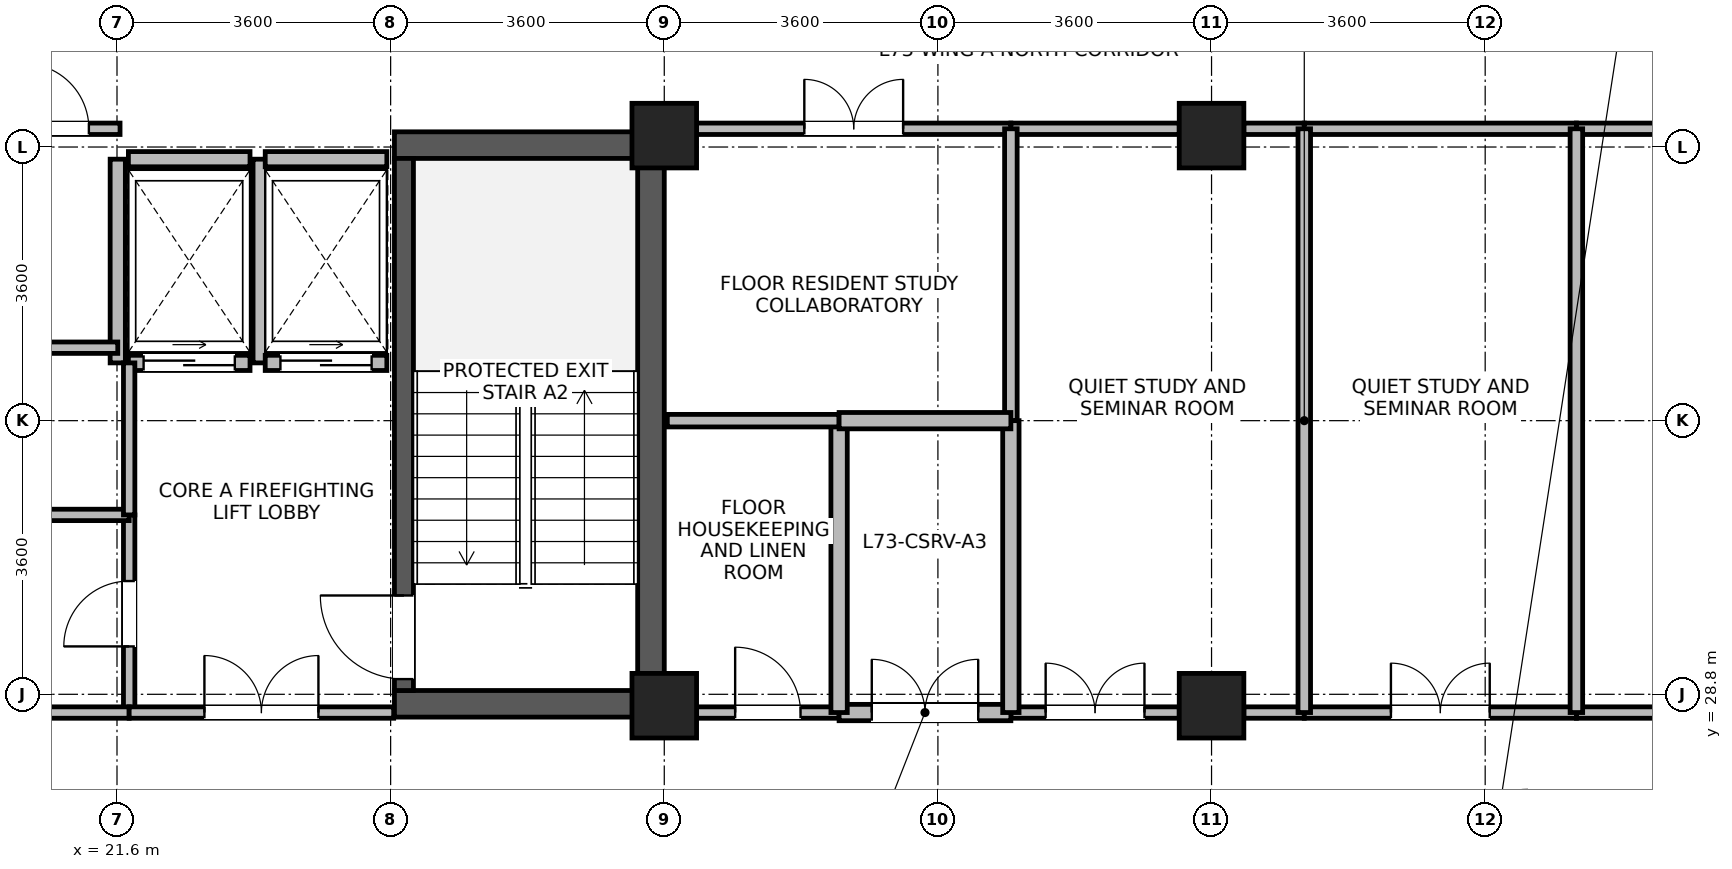
"""IFC4 building model, lengths in metres.
Left out: names, types, materials, properties, quantities, classifications, styles, units other than length and angle.
Written with IfcOpenShell. Run it as: python <this file> out.ifc"""

import sys

from ifc_helpers import new_model, si_unit, direction, frame, frame_2d, origin, origin_2d, place, context, subcontext, project, spatial, rectangle, extrude, source, transform, mapped, element, fill, save


model = new_model("IFC4")
c1 = context("Model", 3, precision=1e-05, world=origin(), true_north=direction((0.0, 1.0)))
c2 = subcontext(c1, "Body", "Model", "MODEL_VIEW")
j1 = project(units=[si_unit("LENGTHUNIT", "METRE"), si_unit("PLANEANGLEUNIT", "RADIAN")], contexts=[c1])
p1 = place(None, origin())
s1 = spatial("IfcSite", under=j1, at=p1, CompositionType="ELEMENT")
p2 = place(p1, origin())
s2 = spatial("IfcBuilding", under=s1, at=p2, CompositionType="ELEMENT")
p3 = place(p2, frame((0.0, 0.0, 283.2)))
s3 = spatial("IfcBuildingStorey", under=s2, at=p3, CompositionType="ELEMENT", Elevation=283.2)
p4 = place(p3, frame((28.625, 28.5, 0.0), z_axis=(0.0, 0.0, 1.0), x_axis=(0.0, 1.0, 0.0)))
e1 = element("IfcWall", 1, at=p4, inside=s3, PredefinedType="SHEAR", context=c2, shape_type="SweptSolid", body=[
    extrude(rectangle(XDim=7.7, YDim=0.35, at=frame_2d((3.85, 0.0))), origin(), (0.0, 0.0, 1.0), 3.475),
])
for number, where, z_axis, x_axis in (
    (2, (25.25, 28.675, 0.0), (0.0, 0.0, 1.0), (1.0, 0.0, 0.0)),
    (3, (25.25, 36.025, 0.0), (0.0, 0.0, 1.0), (1.0, 0.0, 0.0)),
):
    element("IfcWall", number, at=place(p3, frame(where, z_axis=z_axis, x_axis=x_axis)), inside=s3, PredefinedType="SHEAR", context=c2, shape_type="SweptSolid", body=[
        extrude(rectangle(XDim=3.2, YDim=0.35, at=frame_2d((1.6, 0.0))), origin(), (0.0, 0.0, 1.0), 3.475),
    ])
p5 = place(p3, frame((25.375, 28.85, 0.0), z_axis=(0.0, 0.0, 1.0), x_axis=(0.0, 1.0, 0.0)))
e4 = element("IfcWall", 4, at=p5, inside=s3, PredefinedType="SHEAR", context=c2, shape_type="SweptSolid", body=[
    extrude(rectangle(XDim=7.0, YDim=0.25, at=frame_2d((3.5, 0.0))), origin(), (0.0, 0.0, 1.0), 3.475),
])
p6 = place(p5, frame((0.15, 0.0, 0.0)))
e5 = element("IfcOpeningElement", 5, at=p6, cuts=e4, PredefinedType="OPENING", context=c2, shape_type="SweptSolid", body=[
    extrude(rectangle(XDim=1.1, YDim=2.08, at=frame_2d((0.55, 1.04))), frame((0.0, 0.135, 0.0), z_axis=(0.0, -1.0, 0.0), x_axis=(1.0, 0.0, 0.0)), (0.0, 0.0, 1.0), 0.27),
])
m1 = source(origin(), c2, "Body", "SweptSolid", [
    extrude(rectangle(XDim=0.85, YDim=0.85, at=origin_2d()), origin(), (0.0, 0.0, 1.0), 3.7),
])
for number, where, z_axis, x_axis in (
    (6, (28.8, 28.65, 0.0), (0.0, 0.0, 1.0), (1.0, 0.0, 0.0)),
    (7, (28.8, 36.15, 0.0), (0.0, 0.0, 1.0), (1.0, 0.0, 0.0)),
    (8, (36.0, 28.65, 0.0), (0.0, 0.0, 1.0), (1.0, 0.0, 0.0)),
    (9, (36.0, 36.15, 0.0), (0.0, 0.0, 1.0), (1.0, 0.0, 0.0)),
):
    element("IfcColumn", number, at=place(p3, frame(where, z_axis=z_axis, x_axis=x_axis)), inside=s3, PredefinedType="COLUMN", context=c2, shape_type="MappedRepresentation", body=[
        mapped(m1, transform((0.0, 0.0, 0.0), x_axis=(1.0, 0.0, 0.0), y_axis=(0.0, 1.0, 0.0), z_axis=(0.0, 0.0, 1.0), scale=1.0)),
    ])
p7 = place(p3, frame((21.75, 33.16, 0.0), z_axis=(0.0, 0.0, 1.0), x_axis=(1.0, 0.0, 0.0)))
e10 = element("IfcWall", 10, at=p7, inside=s3, PredefinedType="PARTITIONING", context=c2, shape_type="SweptSolid", body=[
    extrude(rectangle(XDim=1.6, YDim=0.2, at=frame_2d((0.8, 0.0))), origin(), (0.0, 0.0, 1.0), 3.455),
])
p8 = place(p7, frame((0.2, 0.0, 0.0)))
e11 = element("IfcOpeningElement", 11, at=p8, cuts=e10, PredefinedType="OPENING", context=c2, shape_type="SweptSolid", body=[
    extrude(rectangle(XDim=1.2, YDim=2.12, at=frame_2d((0.6, 1.06))), frame((0.0, 0.11, 0.0), z_axis=(0.0, -1.0, 0.0), x_axis=(1.0, 0.0, 0.0)), (0.0, 0.0, 1.0), 0.22),
])
p9 = place(p3, frame((21.75, 35.84, 0.0), z_axis=(0.0, 0.0, 1.0), x_axis=(1.0, 0.0, 0.0)))
e12 = element("IfcWall", 12, at=p9, inside=s3, PredefinedType="PARTITIONING", context=c2, shape_type="SweptSolid", body=[
    extrude(rectangle(XDim=1.6, YDim=0.2, at=frame_2d((0.8, 0.0))), origin(), (0.0, 0.0, 1.0), 2.555),
])
for number, where, z_axis, x_axis in (
    (13, (21.61, 33.16, 0.0), (0.0, 0.0, 1.0), (0.0, 1.0, 0.0)),
    (14, (23.49, 33.16, 0.0), (0.0, 0.0, 1.0), (0.0, 1.0, 0.0)),
):
    element("IfcWall", number, at=place(p3, frame(where, z_axis=z_axis, x_axis=x_axis)), inside=s3, PredefinedType="PARTITIONING", context=c2, shape_type="SweptSolid", body=[
        extrude(rectangle(XDim=2.68, YDim=0.2, at=frame_2d((1.34, 0.0))), origin(), (0.0, 0.0, 1.0), 3.455),
    ])
p10 = place(p3, frame((23.55, 33.16, 0.0), z_axis=(0.0, 0.0, 1.0), x_axis=(1.0, 0.0, 0.0)))
e15 = element("IfcWall", 15, at=p10, inside=s3, PredefinedType="PARTITIONING", context=c2, shape_type="SweptSolid", body=[
    extrude(rectangle(XDim=1.6, YDim=0.2, at=frame_2d((0.8, 0.0))), origin(), (0.0, 0.0, 1.0), 3.455),
])
p11 = place(p10, frame((0.2, 0.0, 0.0)))
e16 = element("IfcOpeningElement", 16, at=p11, cuts=e15, PredefinedType="OPENING", context=c2, shape_type="SweptSolid", body=[
    extrude(rectangle(XDim=1.2, YDim=2.12, at=frame_2d((0.6, 1.06))), frame((0.0, 0.11, 0.0), z_axis=(0.0, -1.0, 0.0), x_axis=(1.0, 0.0, 0.0)), (0.0, 0.0, 1.0), 0.22),
])
p12 = place(p3, frame((23.55, 35.84, 0.0), z_axis=(0.0, 0.0, 1.0), x_axis=(1.0, 0.0, 0.0)))
e17 = element("IfcWall", 17, at=p12, inside=s3, PredefinedType="PARTITIONING", context=c2, shape_type="SweptSolid", body=[
    extrude(rectangle(XDim=1.6, YDim=0.2, at=frame_2d((0.8, 0.0))), origin(), (0.0, 0.0, 1.0), 2.555),
])
p13 = place(p3, frame((40.8, 28.56, 0.0), z_axis=(0.0, 0.0, 1.0), x_axis=(1.0, 0.0, 0.0)))
e18 = element("IfcWall", 18, at=p13, inside=s3, PredefinedType="PARTITIONING", context=c2, shape_type="SweptSolid", body=[
    extrude(rectangle(XDim=5.575, YDim=0.15, at=frame_2d((2.788, 0.0))), origin(), (0.0, 0.0, 1.0), 2.905),
])
p14 = place(p13, frame((2.137, 0.0, 0.0)))
e19 = element("IfcOpeningElement", 19, at=p14, cuts=e18, PredefinedType="OPENING", context=c2, shape_type="SweptSolid", body=[
    extrude(rectangle(XDim=1.3, YDim=2.12, at=frame_2d((0.65, 1.06))), frame((0.0, 0.085, 0.0), z_axis=(0.0, -1.0, 0.0), x_axis=(1.0, 0.0, 0.0)), (0.0, 0.0, 1.0), 0.17),
])
p15 = place(p3, frame((40.8, 36.24, 0.0), z_axis=(0.0, 0.0, 1.0), x_axis=(1.0, 0.0, 0.0)))
e20 = element("IfcWall", 20, at=p15, inside=s3, PredefinedType="PARTITIONING", context=c2, shape_type="SweptSolid", body=[
    extrude(rectangle(XDim=5.575, YDim=0.15, at=frame_2d((2.788, 0.0))), origin(), (0.0, 0.0, 1.0), 2.905),
])
p16 = place(p3, frame((29.225, 36.24, 0.0), z_axis=(0.0, 0.0, 1.0), x_axis=(1.0, 0.0, 0.0)))
e21 = element("IfcWall", 21, at=p16, inside=s3, PredefinedType="PARTITIONING", context=c2, shape_type="SweptSolid", body=[
    extrude(rectangle(XDim=4.135, YDim=0.15, at=frame_2d((2.067, 0.0))), origin(), (0.0, 0.0, 1.0), 2.905),
])
p17 = place(p16, frame((1.417, 0.0, 0.0)))
e22 = element("IfcOpeningElement", 22, at=p17, cuts=e21, PredefinedType="OPENING", context=c2, shape_type="SweptSolid", body=[
    extrude(rectangle(XDim=1.3, YDim=2.12, at=frame_2d((0.65, 1.06))), frame((0.0, 0.085, 0.0), z_axis=(0.0, -1.0, 0.0), x_axis=(1.0, 0.0, 0.0)), (0.0, 0.0, 1.0), 0.17),
])
p18 = place(p3, frame((33.36, 28.56, 0.0), z_axis=(0.0, 0.0, 1.0), x_axis=(1.0, 0.0, 0.0)))
e23 = element("IfcWall", 23, at=p18, inside=s3, PredefinedType="PARTITIONING", context=c2, shape_type="SweptSolid", body=[
    extrude(rectangle(XDim=2.215, YDim=0.15, at=frame_2d((1.107, 0.0))), origin(), (0.0, 0.0, 1.0), 2.905),
])
p19 = place(p18, frame((0.458, 0.0, 0.0)))
e24 = element("IfcOpeningElement", 24, at=p19, cuts=e23, PredefinedType="OPENING", context=c2, shape_type="SweptSolid", body=[
    extrude(rectangle(XDim=1.3, YDim=2.12, at=frame_2d((0.65, 1.06))), frame((0.0, 0.085, 0.0), z_axis=(0.0, -1.0, 0.0), x_axis=(1.0, 0.0, 0.0)), (0.0, 0.0, 1.0), 0.17),
])
p20 = place(p3, frame((36.425, 28.56, 0.0), z_axis=(0.0, 0.0, 1.0), x_axis=(1.0, 0.0, 0.0)))
e25 = element("IfcWall", 25, at=p20, inside=s3, PredefinedType="PARTITIONING", context=c2, shape_type="SweptSolid", body=[
    extrude(rectangle(XDim=0.795, YDim=0.15, at=frame_2d((0.397, 0.0))), origin(), (0.0, 0.0, 1.0), 2.905),
])
p21 = place(p3, frame((33.36, 36.24, 0.0), z_axis=(0.0, 0.0, 1.0), x_axis=(1.0, 0.0, 0.0)))
e26 = element("IfcWall", 26, at=p21, inside=s3, PredefinedType="PARTITIONING", context=c2, shape_type="SweptSolid", body=[
    extrude(rectangle(XDim=2.215, YDim=0.15, at=frame_2d((1.107, 0.0))), origin(), (0.0, 0.0, 1.0), 2.905),
])
p22 = place(p3, frame((36.425, 36.24, 0.0), z_axis=(0.0, 0.0, 1.0), x_axis=(1.0, 0.0, 0.0)))
e27 = element("IfcWall", 27, at=p22, inside=s3, PredefinedType="PARTITIONING", context=c2, shape_type="SweptSolid", body=[
    extrude(rectangle(XDim=0.795, YDim=0.15, at=frame_2d((0.397, 0.0))), origin(), (0.0, 0.0, 1.0), 2.905),
])
p23 = place(p3, frame((37.22, 28.56, 0.0), z_axis=(0.0, 0.0, 1.0), x_axis=(1.0, 0.0, 0.0)))
e28 = element("IfcWall", 28, at=p23, inside=s3, PredefinedType="PARTITIONING", context=c2, shape_type="SweptSolid", body=[
    extrude(rectangle(XDim=3.58, YDim=0.15, at=frame_2d((1.79, 0.0))), origin(), (0.0, 0.0, 1.0), 2.905),
])
p24 = place(p23, frame((1.14, 0.0, 0.0)))
e29 = element("IfcOpeningElement", 29, at=p24, cuts=e28, PredefinedType="OPENING", context=c2, shape_type="SweptSolid", body=[
    extrude(rectangle(XDim=1.3, YDim=2.12, at=frame_2d((0.65, 1.06))), frame((0.0, 0.085, 0.0), z_axis=(0.0, -1.0, 0.0), x_axis=(1.0, 0.0, 0.0)), (0.0, 0.0, 1.0), 0.17),
])
p25 = place(p3, frame((37.22, 36.24, 0.0), z_axis=(0.0, 0.0, 1.0), x_axis=(1.0, 0.0, 0.0)))
e30 = element("IfcWall", 30, at=p25, inside=s3, PredefinedType="PARTITIONING", context=c2, shape_type="SweptSolid", body=[
    extrude(rectangle(XDim=3.58, YDim=0.15, at=frame_2d((1.79, 0.0))), origin(), (0.0, 0.0, 1.0), 2.905),
])
p26 = place(p3, frame((21.76, 28.56, 0.0), z_axis=(0.0, 0.0, 1.0), x_axis=(0.0, 1.0, 0.0)))
e31 = element("IfcWall", 31, at=p26, inside=s3, PredefinedType="PARTITIONING", context=c2, shape_type="SweptSolid", body=[
    extrude(rectangle(XDim=2.6, YDim=0.15, at=frame_2d((1.3, 0.0))), origin(), (0.0, 0.0, 1.0), 3.455),
])
p27 = place(p26, frame((0.87, 0.0, 0.0)))
e32 = element("IfcOpeningElement", 32, at=p27, cuts=e31, PredefinedType="OPENING", context=c2, shape_type="SweptSolid", body=[
    extrude(rectangle(XDim=0.86, YDim=2.02, at=frame_2d((0.43, 1.01))), frame((0.0, 0.085, 0.0), z_axis=(0.0, -1.0, 0.0), x_axis=(1.0, 0.0, 0.0)), (0.0, 0.0, 1.0), 0.17),
])
p28 = place(p3, frame((29.225, 28.56, 0.0), z_axis=(0.0, 0.0, 1.0), x_axis=(1.0, 0.0, 0.0)))
e33 = element("IfcWall", 33, at=p28, inside=s3, PredefinedType="PARTITIONING", context=c2, shape_type="SweptSolid", body=[
    extrude(rectangle(XDim=1.875, YDim=0.15, at=frame_2d((0.938, 0.0))), origin(), (0.0, 0.0, 1.0), 2.905),
])
p29 = place(p28, frame((0.508, 0.0, 0.0)))
e34 = element("IfcOpeningElement", 34, at=p29, cuts=e33, PredefinedType="OPENING", context=c2, shape_type="SweptSolid", body=[
    extrude(rectangle(XDim=0.86, YDim=2.02, at=frame_2d((0.43, 1.01))), frame((0.0, 0.085, 0.0), z_axis=(0.0, -1.0, 0.0), x_axis=(1.0, 0.0, 0.0)), (0.0, 0.0, 1.0), 0.17),
])
p30 = place(p3, frame((31.1, 28.56, 0.0), z_axis=(0.0, 0.0, 1.0), x_axis=(1.0, 0.0, 0.0)))
e35 = element("IfcWall", 35, at=p30, inside=s3, PredefinedType="PARTITIONING", context=c2, shape_type="SweptSolid", body=[
    extrude(rectangle(XDim=2.26, YDim=0.215, at=frame_2d((1.13, 0.0))), origin(), (0.0, 0.0, 1.0), 2.905),
])
p31 = place(p30, frame((0.43, 0.0, 0.0)))
e36 = element("IfcOpeningElement", 36, at=p31, cuts=e35, PredefinedType="OPENING", context=c2, shape_type="SweptSolid", body=[
    extrude(rectangle(XDim=1.4, YDim=2.15, at=frame_2d((0.7, 1.075))), frame((0.0, 0.118, 0.0), z_axis=(0.0, -1.0, 0.0), x_axis=(1.0, 0.0, 0.0)), (0.0, 0.0, 1.0), 0.235),
])
p32 = place(p3, frame((19.96, 33.36, 0.0), z_axis=(0.0, 0.0, 1.0), x_axis=(1.0, 0.0, 0.0)))
e37 = element("IfcWall", 37, at=p32, inside=s3, PredefinedType="PARTITIONING", context=c2, shape_type="SweptSolid", body=[
    extrude(rectangle(XDim=1.65, YDim=0.15, at=frame_2d((0.825, 0.0))), origin(), (0.0, 0.0, 1.0), 3.455),
])
p33 = place(p3, frame((19.96, 36.24, 0.0), z_axis=(0.0, 0.0, 1.0), x_axis=(1.0, 0.0, 0.0)))
e38 = element("IfcWall", 38, at=p33, inside=s3, PredefinedType="PARTITIONING", context=c2, shape_type="SweptSolid", body=[
    extrude(rectangle(XDim=1.68, YDim=0.15, at=frame_2d((0.84, 0.0))), origin(), (0.0, 0.0, 1.0), 2.555),
])
p34 = place(p33, frame((0.41, 0.0, 0.0)))
e39 = element("IfcOpeningElement", 39, at=p34, cuts=e38, PredefinedType="OPENING", context=c2, shape_type="SweptSolid", body=[
    extrude(rectangle(XDim=0.86, YDim=2.02, at=frame_2d((0.43, 1.01))), frame((0.0, 0.085, 0.0), z_axis=(0.0, -1.0, 0.0), x_axis=(1.0, 0.0, 0.0)), (0.0, 0.0, 1.0), 0.17),
])
p35 = place(p3, frame((20.56, 28.56, 0.0), z_axis=(0.0, 0.0, 1.0), x_axis=(1.0, 0.0, 0.0)))
e40 = element("IfcWall", 40, at=p35, inside=s3, PredefinedType="PARTITIONING", context=c2, shape_type="SweptSolid", body=[
    extrude(rectangle(XDim=1.2, YDim=0.15, at=frame_2d((0.6, 0.0))), origin(), (0.0, 0.0, 1.0), 2.555),
])
p36 = place(p3, frame((20.56, 31.16, 0.0), z_axis=(0.0, 0.0, 1.0), x_axis=(1.0, 0.0, 0.0)))
e41 = element("IfcWall", 41, at=p36, inside=s3, PredefinedType="PARTITIONING", context=c2, shape_type="SweptSolid", body=[
    extrude(rectangle(XDim=1.2, YDim=0.15, at=frame_2d((0.6, 0.0))), origin(), (0.0, 0.0, 1.0), 3.455),
])
for number, where, z_axis, x_axis in (
    (42, (37.22, 28.56, 0.0), (0.0, 0.0, 1.0), (0.0, 1.0, 0.0)),
    (43, (40.8, 28.56, 0.0), (0.0, 0.0, 1.0), (0.0, 1.0, 0.0)),
):
    element("IfcWall", number, at=place(p3, frame(where, z_axis=z_axis, x_axis=x_axis)), inside=s3, PredefinedType="PARTITIONING", context=c2, shape_type="SweptSolid", body=[
        extrude(rectangle(XDim=7.68, YDim=0.165, at=frame_2d((3.84, 0.0))), origin(), (0.0, 0.0, 1.0), 3.455),
    ])
p37 = place(p3, frame((33.36, 32.4, 0.0), z_axis=(0.0, 0.0, 1.0), x_axis=(0.0, 1.0, 0.0)))
e44 = element("IfcWall", 44, at=p37, inside=s3, PredefinedType="PARTITIONING", context=c2, shape_type="SweptSolid", body=[
    extrude(rectangle(XDim=3.84, YDim=0.165, at=frame_2d((1.92, 0.0))), origin(), (0.0, 0.0, 1.0), 3.455),
])
for number, where, z_axis, x_axis in (
    (45, (31.1, 28.56, 0.0), (0.0, 0.0, 1.0), (0.0, 1.0, 0.0)),
    (46, (33.36, 28.56, 0.0), (0.0, 0.0, 1.0), (0.0, 1.0, 0.0)),
):
    element("IfcWall", number, at=place(p3, frame(where, z_axis=z_axis, x_axis=x_axis)), inside=s3, PredefinedType="PARTITIONING", context=c2, shape_type="SweptSolid", body=[
        extrude(rectangle(XDim=3.84, YDim=0.215, at=frame_2d((1.92, 0.0))), origin(), (0.0, 0.0, 1.0), 3.455),
    ])
p38 = place(p3, frame((21.76, 28.56, 0.0), z_axis=(0.0, 0.0, 1.0), x_axis=(1.0, 0.0, 0.0)))
e47 = element("IfcWall", 47, at=p38, inside=s3, PredefinedType="PARTITIONING", context=c2, shape_type="SweptSolid", body=[
    extrude(rectangle(XDim=3.48, YDim=0.15, at=frame_2d((1.74, 0.0))), origin(), (0.0, 0.0, 1.0), 2.555),
])
p39 = place(p38, frame((0.99, 0.0, 0.0)))
e48 = element("IfcOpeningElement", 48, at=p39, cuts=e47, PredefinedType="OPENING", context=c2, shape_type="SweptSolid", body=[
    extrude(rectangle(XDim=1.5, YDim=2.1, at=frame_2d((0.75, 1.05))), frame((0.0, 0.085, 0.0), z_axis=(0.0, -1.0, 0.0), x_axis=(1.0, 0.0, 0.0)), (0.0, 0.0, 1.0), 0.17),
])
p40 = place(p3, frame((28.84, 32.4, 0.0), z_axis=(0.0, 0.0, 1.0), x_axis=(1.0, 0.0, 0.0)))
e49 = element("IfcWall", 49, at=p40, inside=s3, PredefinedType="PARTITIONING", context=c2, shape_type="SweptSolid", body=[
    extrude(rectangle(XDim=2.26, YDim=0.165, at=frame_2d((1.13, 0.0))), origin(), (0.0, 0.0, 1.0), 3.455),
])
p41 = place(p3, frame((31.1, 32.4, 0.0), z_axis=(0.0, 0.0, 1.0), x_axis=(1.0, 0.0, 0.0)))
e50 = element("IfcWall", 50, at=p41, inside=s3, PredefinedType="PARTITIONING", context=c2, shape_type="SweptSolid", body=[
    extrude(rectangle(XDim=2.26, YDim=0.215, at=frame_2d((1.13, 0.0))), origin(), (0.0, 0.0, 1.0), 3.455),
])
p42 = place(p3, frame((21.76, 31.16, 0.0), z_axis=(0.0, 0.0, 1.0), x_axis=(0.0, 1.0, 0.0)))
e51 = element("IfcWall", 51, at=p42, inside=s3, PredefinedType="PARTITIONING", context=c2, shape_type="SweptSolid", body=[
    extrude(rectangle(XDim=2.0, YDim=0.15, at=frame_2d((1.0, 0.0))), origin(), (0.0, 0.0, 1.0), 3.455),
])
p43 = place(p6, origin())
e52 = element("IfcDoor", 52, at=p43, inside=s3, OperationType="SINGLE_SWING_RIGHT", PredefinedType="DOOR", context=c2, shape_type="SweptSolid", body=[
    extrude(rectangle(XDim=1.1, YDim=2.08, at=frame_2d((0.55, 1.04))), frame((0.0, 0.025, 0.0), z_axis=(0.0, -1.0, 0.0), x_axis=(1.0, 0.0, 0.0)), (0.0, 0.0, 1.0), 0.05),
])
fill(e5, e52)
p44 = place(p8, origin())
e53 = element("IfcDoor", 53, at=p44, inside=s3, OperationType="SLIDING_TO_RIGHT", PredefinedType="DOOR", context=c2, shape_type="SweptSolid", body=[
    extrude(rectangle(XDim=1.2, YDim=2.12, at=frame_2d((0.6, 1.06))), frame((0.0, 0.025, 0.0), z_axis=(0.0, -1.0, 0.0), x_axis=(1.0, 0.0, 0.0)), (0.0, 0.0, 1.0), 0.05),
])
fill(e11, e53)
p45 = place(p11, origin())
e54 = element("IfcDoor", 54, at=p45, inside=s3, OperationType="SLIDING_TO_RIGHT", PredefinedType="DOOR", context=c2, shape_type="SweptSolid", body=[
    extrude(rectangle(XDim=1.2, YDim=2.12, at=frame_2d((0.6, 1.06))), frame((0.0, 0.025, 0.0), z_axis=(0.0, -1.0, 0.0), x_axis=(1.0, 0.0, 0.0)), (0.0, 0.0, 1.0), 0.05),
])
fill(e16, e54)
p46 = place(p17, origin())
e55 = element("IfcDoor", 55, at=p46, inside=s3, OperationType="DOUBLE_DOOR_SINGLE_SWING", PredefinedType="DOOR", context=c2, shape_type="SweptSolid", body=[
    extrude(rectangle(XDim=1.3, YDim=2.12, at=frame_2d((0.65, 1.06))), frame((0.0, 0.025, 0.0), z_axis=(0.0, -1.0, 0.0), x_axis=(1.0, 0.0, 0.0)), (0.0, 0.0, 1.0), 0.05),
])
fill(e22, e55)
p47 = place(p19, origin())
e56 = element("IfcDoor", 56, at=p47, inside=s3, OperationType="DOUBLE_DOOR_SINGLE_SWING", PredefinedType="DOOR", context=c2, shape_type="SweptSolid", body=[
    extrude(rectangle(XDim=1.3, YDim=2.12, at=frame_2d((0.65, 1.06))), frame((0.0, 0.025, 0.0), z_axis=(0.0, -1.0, 0.0), x_axis=(1.0, 0.0, 0.0)), (0.0, 0.0, 1.0), 0.05),
])
fill(e24, e56)
p48 = place(p24, origin())
e57 = element("IfcDoor", 57, at=p48, inside=s3, OperationType="DOUBLE_DOOR_SINGLE_SWING", PredefinedType="DOOR", context=c2, shape_type="SweptSolid", body=[
    extrude(rectangle(XDim=1.3, YDim=2.12, at=frame_2d((0.65, 1.06))), frame((0.0, 0.025, 0.0), z_axis=(0.0, -1.0, 0.0), x_axis=(1.0, 0.0, 0.0)), (0.0, 0.0, 1.0), 0.05),
])
fill(e29, e57)
p49 = place(p27, origin())
e58 = element("IfcDoor", 58, at=p49, inside=s3, OperationType="SINGLE_SWING_LEFT", PredefinedType="DOOR", context=c2, shape_type="SweptSolid", body=[
    extrude(rectangle(XDim=0.86, YDim=2.02, at=frame_2d((0.43, 1.01))), frame((0.0, 0.025, 0.0), z_axis=(0.0, -1.0, 0.0), x_axis=(1.0, 0.0, 0.0)), (0.0, 0.0, 1.0), 0.05),
])
fill(e32, e58)
p50 = place(p29, origin())
e59 = element("IfcDoor", 59, at=p50, inside=s3, OperationType="SINGLE_SWING_LEFT", PredefinedType="DOOR", context=c2, shape_type="SweptSolid", body=[
    extrude(rectangle(XDim=0.86, YDim=2.02, at=frame_2d((0.43, 1.01))), frame((0.0, 0.025, 0.0), z_axis=(0.0, -1.0, 0.0), x_axis=(1.0, 0.0, 0.0)), (0.0, 0.0, 1.0), 0.05),
])
fill(e34, e59)
p51 = place(p31, origin())
e60 = element("IfcDoor", 60, at=p51, inside=s3, OperationType="DOUBLE_DOOR_SINGLE_SWING", PredefinedType="DOOR", context=c2, shape_type="SweptSolid", body=[
    extrude(rectangle(XDim=1.4, YDim=2.15, at=frame_2d((0.7, 1.075))), frame((0.0, 0.025, 0.0), z_axis=(0.0, -1.0, 0.0), x_axis=(1.0, 0.0, 0.0)), (0.0, 0.0, 1.0), 0.05),
])
fill(e36, e60)
p52 = place(p34, origin())
e61 = element("IfcDoor", 61, at=p52, inside=s3, OperationType="SINGLE_SWING_LEFT", PredefinedType="DOOR", context=c2, shape_type="SweptSolid", body=[
    extrude(rectangle(XDim=0.86, YDim=2.02, at=frame_2d((0.43, 1.01))), frame((0.0, 0.025, 0.0), z_axis=(0.0, -1.0, 0.0), x_axis=(1.0, 0.0, 0.0)), (0.0, 0.0, 1.0), 0.05),
])
fill(e39, e61)
p53 = place(p39, origin())
e62 = element("IfcDoor", 62, at=p53, inside=s3, OperationType="DOUBLE_DOOR_SINGLE_SWING", PredefinedType="DOOR", context=c2, shape_type="SweptSolid", body=[
    extrude(rectangle(XDim=1.5, YDim=2.1, at=frame_2d((0.75, 1.05))), frame((0.0, 0.025, 0.0), z_axis=(0.0, -1.0, 0.0), x_axis=(1.0, 0.0, 0.0)), (0.0, 0.0, 1.0), 0.05),
])
fill(e48, e62)
save(model, sys.argv[1])
